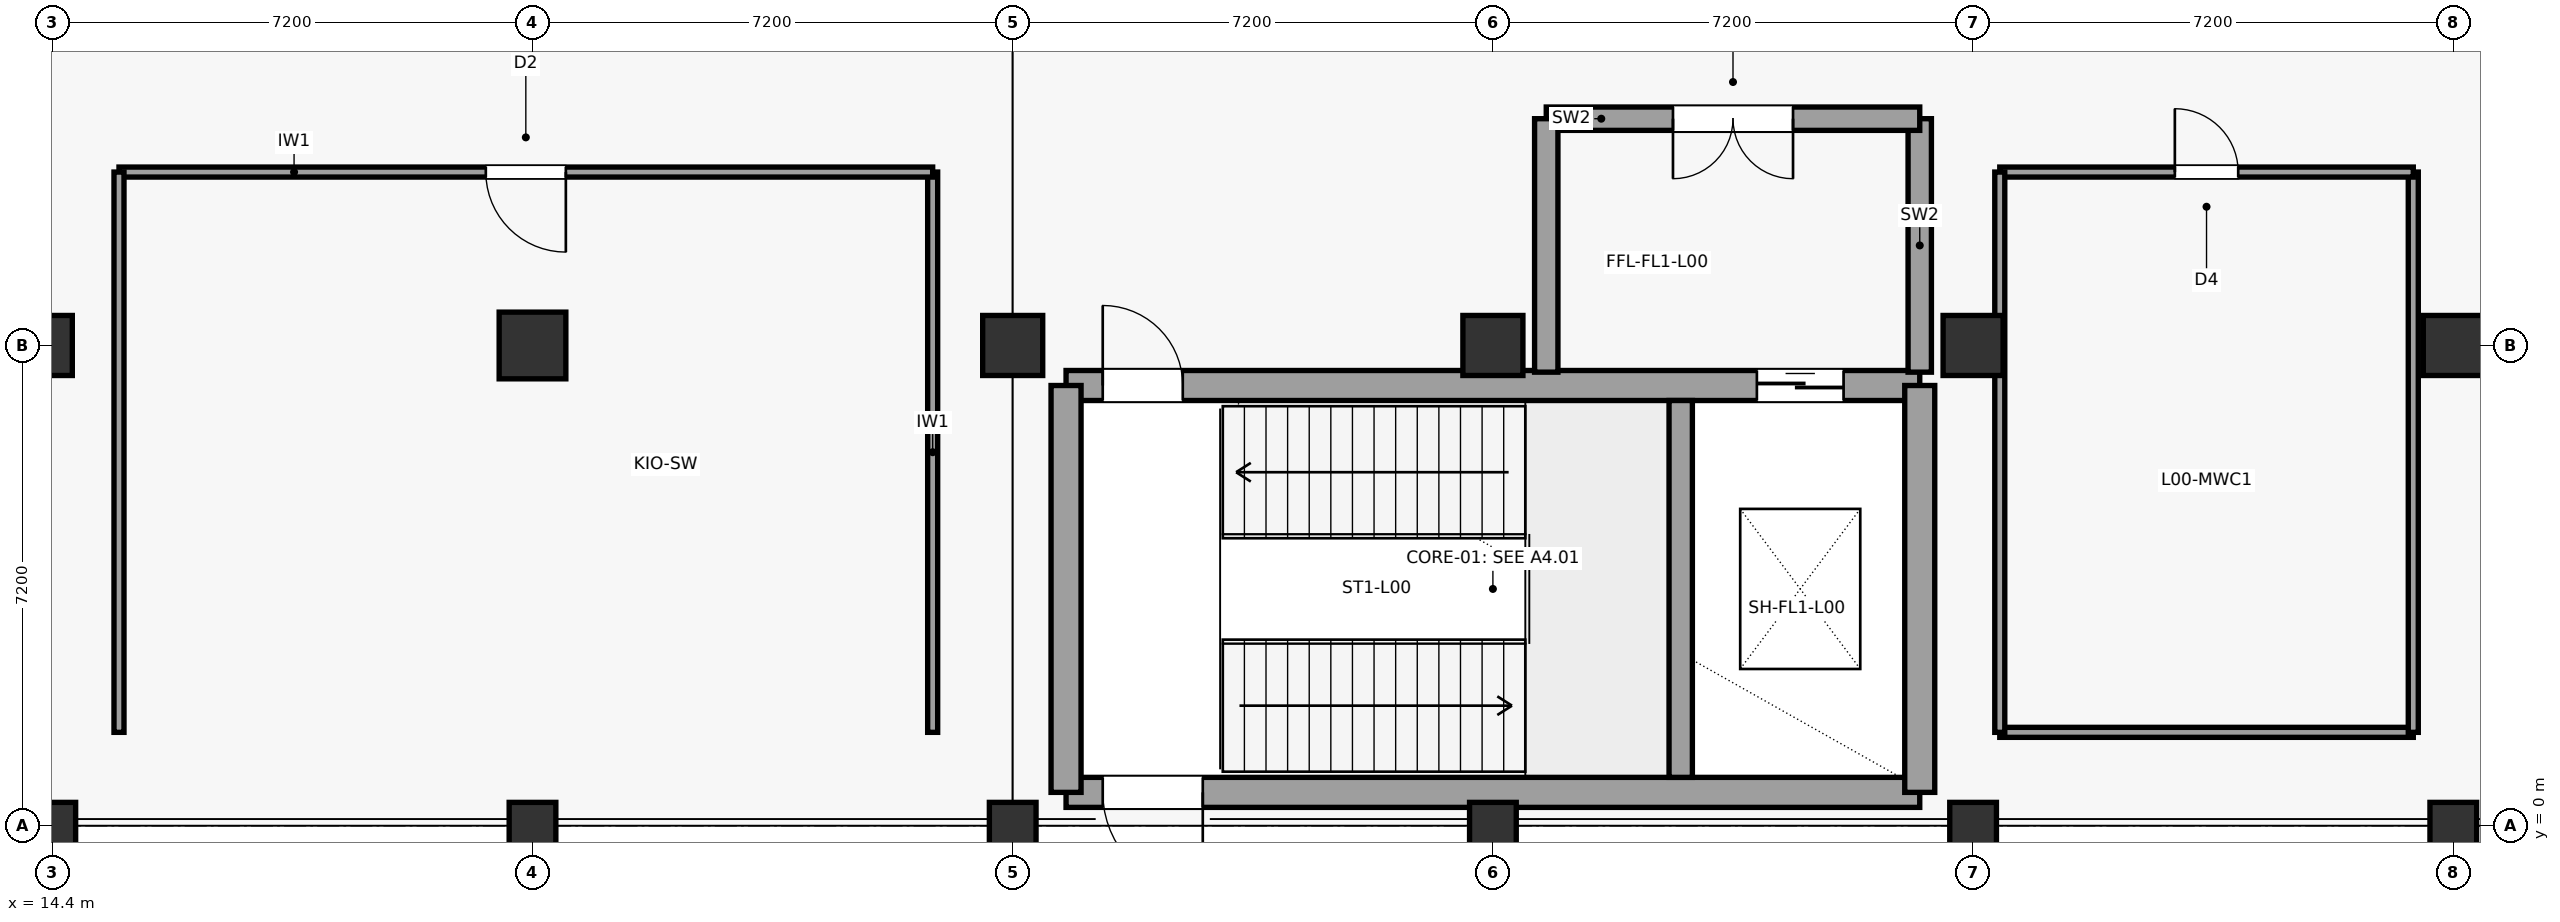
"""IFC4 building model, lengths in metres.
Left out: names, types, materials, properties, quantities, classifications, styles, units other than length and angle.
Written with IfcOpenShell. Run it as: python <this file> out.ifc"""

import sys

from ifc_helpers import new_model, si_unit, direction, frame, frame_2d, origin, origin_2d, place, context, subcontext, project, spatial, rectangle, circle, extrude, element, fill, save


model = new_model("IFC4")
c1 = context("Model", 3, precision=1e-05, world=origin(), true_north=direction((0.0, 1.0)))
c2 = subcontext(c1, "Body", "Model", "MODEL_VIEW")
j1 = project(units=[si_unit("LENGTHUNIT", "METRE"), si_unit("PLANEANGLEUNIT", "RADIAN")], contexts=[c1])
p1 = place(None, origin())
s1 = spatial("IfcSite", under=j1, at=p1, CompositionType="ELEMENT")
p2 = place(p1, origin())
s2 = spatial("IfcBuilding", under=s1, at=p2, CompositionType="ELEMENT")
p3 = place(p2, origin())
s3 = spatial("IfcBuildingStorey", under=s2, at=p3, CompositionType="ELEMENT", Elevation=0.0)
p4 = place(p3, frame((14.4, 0.0, 0.0), z_axis=(0.0, 0.0, 1.0), x_axis=(1.0, 0.0, 0.0)))
e1 = element("IfcColumn", 1, at=p4, inside=s3, PredefinedType="COLUMN", context=c2, shape_type="SweptSolid", body=[
    extrude(rectangle(XDim=0.7, YDim=0.7, at=origin_2d()), origin(), (0.0, 0.0, 1.0), 5.4),
])
p5 = place(p3, frame((14.4, 7.2, 0.0), z_axis=(0.0, 0.0, 1.0), x_axis=(1.0, 0.0, 0.0)))
e2 = element("IfcColumn", 2, at=p5, inside=s3, PredefinedType="COLUMN", context=c2, shape_type="SweptSolid", body=[
    extrude(rectangle(XDim=0.6, YDim=0.9, at=origin_2d()), origin(), (0.0, 0.0, 1.0), 5.4),
])
p6 = place(p3, frame((21.6, 0.0, 0.0), z_axis=(0.0, 0.0, 1.0), x_axis=(1.0, 0.0, 0.0)))
e3 = element("IfcColumn", 3, at=p6, inside=s3, PredefinedType="COLUMN", context=c2, shape_type="SweptSolid", body=[
    extrude(rectangle(XDim=0.7, YDim=0.7, at=origin_2d()), origin(), (0.0, 0.0, 1.0), 5.4),
])
p7 = place(p3, frame((21.6, 7.2, 0.0), z_axis=(0.0, 0.0, 1.0), x_axis=(1.0, 0.0, 0.0)))
e4 = element("IfcColumn", 4, at=p7, inside=s3, PredefinedType="COLUMN", context=c2, shape_type="SweptSolid", body=[
    extrude(circle(Radius=0.5, at=origin_2d()), origin(), (0.0, 0.0, 1.0), 5.4),
])
p8 = place(p3, frame((28.8, 0.0, 0.0), z_axis=(0.0, 0.0, 1.0), x_axis=(1.0, 0.0, 0.0)))
e5 = element("IfcColumn", 5, at=p8, inside=s3, PredefinedType="COLUMN", context=c2, shape_type="SweptSolid", body=[
    extrude(rectangle(XDim=0.7, YDim=0.7, at=origin_2d()), origin(), (0.0, 0.0, 1.0), 5.4),
])
p9 = place(p3, frame((28.8, 7.2, 0.0), z_axis=(0.0, 0.0, 1.0), x_axis=(1.0, 0.0, 0.0)))
e6 = element("IfcColumn", 6, at=p9, inside=s3, PredefinedType="COLUMN", context=c2, shape_type="SweptSolid", body=[
    extrude(rectangle(XDim=0.9, YDim=0.9, at=origin_2d()), origin(), (0.0, 0.0, 1.0), 5.4),
])
p10 = place(p3, frame((36.0, 0.0, 0.0), z_axis=(0.0, 0.0, 1.0), x_axis=(1.0, 0.0, 0.0)))
e7 = element("IfcColumn", 7, at=p10, inside=s3, PredefinedType="COLUMN", context=c2, shape_type="SweptSolid", body=[
    extrude(rectangle(XDim=0.7, YDim=0.7, at=origin_2d()), origin(), (0.0, 0.0, 1.0), 5.4),
])
p11 = place(p3, frame((36.0, 7.2, 0.0), z_axis=(0.0, 0.0, 1.0), x_axis=(1.0, 0.0, 0.0)))
e8 = element("IfcColumn", 8, at=p11, inside=s3, PredefinedType="COLUMN", context=c2, shape_type="SweptSolid", body=[
    extrude(rectangle(XDim=0.9, YDim=0.9, at=origin_2d()), origin(), (0.0, 0.0, 1.0), 5.4),
])
p12 = place(p3, frame((43.2, 0.0, 0.0), z_axis=(0.0, 0.0, 1.0), x_axis=(1.0, 0.0, 0.0)))
e9 = element("IfcColumn", 9, at=p12, inside=s3, PredefinedType="COLUMN", context=c2, shape_type="SweptSolid", body=[
    extrude(rectangle(XDim=0.7, YDim=0.7, at=origin_2d()), origin(), (0.0, 0.0, 1.0), 5.4),
])
p13 = place(p3, frame((43.2, 7.2, 0.0), z_axis=(0.0, 0.0, 1.0), x_axis=(1.0, 0.0, 0.0)))
e10 = element("IfcColumn", 10, at=p13, inside=s3, PredefinedType="COLUMN", context=c2, shape_type="SweptSolid", body=[
    extrude(rectangle(XDim=0.9, YDim=0.9, at=origin_2d()), origin(), (0.0, 0.0, 1.0), 5.4),
])
p14 = place(p3, frame((50.4, 0.0, 0.0), z_axis=(0.0, 0.0, 1.0), x_axis=(1.0, 0.0, 0.0)))
e11 = element("IfcColumn", 11, at=p14, inside=s3, PredefinedType="COLUMN", context=c2, shape_type="SweptSolid", body=[
    extrude(rectangle(XDim=0.7, YDim=0.7, at=origin_2d()), origin(), (0.0, 0.0, 1.0), 5.4),
])
p15 = place(p3, frame((50.4, 7.2, 0.0), z_axis=(0.0, 0.0, 1.0), x_axis=(1.0, 0.0, 0.0)))
e12 = element("IfcColumn", 12, at=p15, inside=s3, PredefinedType="COLUMN", context=c2, shape_type="SweptSolid", body=[
    extrude(rectangle(XDim=0.9, YDim=0.9, at=origin_2d()), origin(), (0.0, 0.0, 1.0), 5.4),
])
p16 = place(p3, frame((29.6, 0.5, 0.0), z_axis=(0.0, 0.0, 1.0), x_axis=(1.0, 0.0, 0.0)))
e13 = element("IfcWall", 13, at=p16, inside=s3, PredefinedType="SHEAR", context=c2, shape_type="SweptSolid", body=[
    extrude(rectangle(XDim=12.8, YDim=0.45, at=frame_2d((6.4, 0.0))), origin(), (0.0, 0.0, 1.0), 5.06),
])
p17 = place(p16, frame((0.55, 0.0, 0.0)))
e14 = element("IfcOpeningElement", 14, at=p17, cuts=e13, PredefinedType="OPENING", context=c2, shape_type="SweptSolid", body=[
    extrude(rectangle(XDim=1.5, YDim=2.25, at=frame_2d((0.75, 1.125))), frame((0.0, 0.235, 0.0), z_axis=(0.0, -1.0, 0.0), x_axis=(1.0, 0.0, 0.0)), (0.0, 0.0, 1.0), 0.47),
])
p18 = place(p3, frame((29.6, 6.6, 0.0), z_axis=(0.0, 0.0, 1.0), x_axis=(1.0, 0.0, 0.0)))
e15 = element("IfcWall", 15, at=p18, inside=s3, PredefinedType="SHEAR", context=c2, shape_type="SweptSolid", body=[
    extrude(rectangle(XDim=12.8, YDim=0.45, at=frame_2d((6.4, 0.0))), origin(), (0.0, 0.0, 1.0), 5.06),
])
p19 = place(p18, frame((0.55, 0.0, 0.0)))
e16 = element("IfcOpeningElement", 16, at=p19, cuts=e15, PredefinedType="OPENING", context=c2, shape_type="SweptSolid", body=[
    extrude(rectangle(XDim=1.2, YDim=2.25, at=frame_2d((0.6, 1.125))), frame((0.0, 0.235, 0.0), z_axis=(0.0, -1.0, 0.0), x_axis=(1.0, 0.0, 0.0)), (0.0, 0.0, 1.0), 0.47),
])
p20 = place(p18, frame((10.358, 0.0, 0.0)))
e17 = element("IfcOpeningElement", 17, at=p20, cuts=e15, PredefinedType="OPENING", context=c2, shape_type="SweptSolid", body=[
    extrude(rectangle(XDim=1.3, YDim=2.25, at=frame_2d((0.65, 1.125))), frame((0.0, 0.235, 0.0), z_axis=(0.0, -1.0, 0.0), x_axis=(1.0, 0.0, 0.0)), (0.0, 0.0, 1.0), 0.47),
])
for number, where, z_axis, x_axis in (
    (18, (29.6, 0.5, 0.0), (0.0, 0.0, 1.0), (0.0, 1.0, 0.0)),
    (19, (42.4, 0.5, 0.0), (0.0, 0.0, 1.0), (0.0, 1.0, 0.0)),
):
    element("IfcWall", number, at=place(p3, frame(where, z_axis=z_axis, x_axis=x_axis)), inside=s3, PredefinedType="SHEAR", context=c2, shape_type="SweptSolid", body=[
        extrude(rectangle(XDim=6.1, YDim=0.45, at=frame_2d((3.05, 0.0))), origin(), (0.0, 0.0, 1.0), 5.06),
    ])
p21 = place(p3, frame((38.816, 0.725, 0.0), z_axis=(0.0, 0.0, 1.0), x_axis=(0.0, 1.0, 0.0)))
e20 = element("IfcWall", 20, at=p21, inside=s3, PredefinedType="SHEAR", context=c2, shape_type="SweptSolid", body=[
    extrude(rectangle(XDim=5.65, YDim=0.35, at=frame_2d((2.825, 0.0))), origin(), (0.0, 0.0, 1.0), 5.06),
])
p22 = place(p3, frame((42.4, 6.8, 0.0), z_axis=(0.0, 0.0, 1.0), x_axis=(0.0, 1.0, 0.0)))
e21 = element("IfcWall", 21, at=p22, inside=s3, PredefinedType="SHEAR", context=c2, shape_type="SweptSolid", body=[
    extrude(rectangle(XDim=3.8, YDim=0.35, at=frame_2d((1.9, 0.0))), origin(), (0.0, 0.0, 1.0), 4.1),
])
p23 = place(p3, frame((42.4, 10.6, 0.0), z_axis=(0.0, 0.0, 1.0), x_axis=(-1.0, 0.0, 0.0)))
e22 = element("IfcWall", 22, at=p23, inside=s3, PredefinedType="SHEAR", context=c2, shape_type="SweptSolid", body=[
    extrude(rectangle(XDim=5.6, YDim=0.35, at=frame_2d((2.8, 0.0))), origin(), (0.0, 0.0, 1.0), 4.1),
])
p24 = place(p23, frame((1.9, 0.0, 0.0)))
e23 = element("IfcOpeningElement", 23, at=p24, cuts=e22, PredefinedType="OPENING", context=c2, shape_type="SweptSolid", body=[
    extrude(rectangle(XDim=1.8, YDim=2.3, at=frame_2d((0.9, 1.15))), frame((0.0, 0.185, 0.0), z_axis=(0.0, -1.0, 0.0), x_axis=(1.0, 0.0, 0.0)), (0.0, 0.0, 1.0), 0.37),
])
p25 = place(p3, frame((36.8, 10.6, 0.0), z_axis=(0.0, 0.0, 1.0), x_axis=(0.0, -1.0, 0.0)))
e24 = element("IfcWall", 24, at=p25, inside=s3, PredefinedType="SHEAR", context=c2, shape_type="SweptSolid", body=[
    extrude(rectangle(XDim=3.8, YDim=0.35, at=frame_2d((1.9, 0.0))), origin(), (0.0, 0.0, 1.0), 4.1),
])
p26 = place(p3, frame((27.6, 1.4, 0.0), z_axis=(0.0, 0.0, 1.0), x_axis=(0.0, 1.0, 0.0)))
e25 = element("IfcWall", 25, at=p26, inside=s3, PredefinedType="PARTITIONING", context=c2, shape_type="SweptSolid", body=[
    extrude(rectangle(XDim=8.4, YDim=0.15, at=frame_2d((4.2, 0.0))), origin(), (0.0, 0.0, 1.0), 4.1),
])
p27 = place(p3, frame((27.6, 9.8, 0.0), z_axis=(0.0, 0.0, 1.0), x_axis=(-1.0, 0.0, 0.0)))
e26 = element("IfcWall", 26, at=p27, inside=s3, PredefinedType="PARTITIONING", context=c2, shape_type="SweptSolid", body=[
    extrude(rectangle(XDim=12.2, YDim=0.15, at=frame_2d((6.1, 0.0))), origin(), (0.0, 0.0, 1.0), 4.1),
])
p28 = place(p27, frame((5.5, 0.0, 0.0)))
e27 = element("IfcOpeningElement", 27, at=p28, cuts=e26, PredefinedType="OPENING", context=c2, shape_type="SweptSolid", body=[
    extrude(rectangle(XDim=1.2, YDim=2.2, at=frame_2d((0.6, 1.1))), frame((0.0, 0.085, 0.0), z_axis=(0.0, -1.0, 0.0), x_axis=(1.0, 0.0, 0.0)), (0.0, 0.0, 1.0), 0.17),
])
p29 = place(p3, frame((15.4, 9.8, 0.0), z_axis=(0.0, 0.0, 1.0), x_axis=(0.0, -1.0, 0.0)))
e28 = element("IfcWall", 28, at=p29, inside=s3, PredefinedType="PARTITIONING", context=c2, shape_type="SweptSolid", body=[
    extrude(rectangle(XDim=8.4, YDim=0.15, at=frame_2d((4.2, 0.0))), origin(), (0.0, 0.0, 1.0), 4.1),
])
p30 = place(p3, frame((43.6, 1.4, 0.0), z_axis=(0.0, 0.0, 1.0), x_axis=(1.0, 0.0, 0.0)))
e29 = element("IfcWall", 29, at=p30, inside=s3, PredefinedType="PARTITIONING", context=c2, shape_type="SweptSolid", body=[
    extrude(rectangle(XDim=6.2, YDim=0.15, at=frame_2d((3.1, 0.0))), origin(), (0.0, 0.0, 1.0), 4.1),
])
p31 = place(p3, frame((49.8, 1.4, 0.0), z_axis=(0.0, 0.0, 1.0), x_axis=(0.0, 1.0, 0.0)))
e30 = element("IfcWall", 30, at=p31, inside=s3, PredefinedType="PARTITIONING", context=c2, shape_type="SweptSolid", body=[
    extrude(rectangle(XDim=8.4, YDim=0.15, at=frame_2d((4.2, 0.0))), origin(), (0.0, 0.0, 1.0), 4.1),
])
p32 = place(p3, frame((49.8, 9.8, 0.0), z_axis=(0.0, 0.0, 1.0), x_axis=(-1.0, 0.0, 0.0)))
e31 = element("IfcWall", 31, at=p32, inside=s3, PredefinedType="PARTITIONING", context=c2, shape_type="SweptSolid", body=[
    extrude(rectangle(XDim=6.2, YDim=0.15, at=frame_2d((3.1, 0.0))), origin(), (0.0, 0.0, 1.0), 4.1),
])
p33 = place(p32, frame((2.625, 0.0, 0.0)))
e32 = element("IfcOpeningElement", 32, at=p33, cuts=e31, PredefinedType="OPENING", context=c2, shape_type="SweptSolid", body=[
    extrude(rectangle(XDim=0.95, YDim=2.15, at=frame_2d((0.475, 1.075))), frame((0.0, 0.085, 0.0), z_axis=(0.0, -1.0, 0.0), x_axis=(1.0, 0.0, 0.0)), (0.0, 0.0, 1.0), 0.17),
])
p34 = place(p3, frame((43.6, 9.8, 0.0), z_axis=(0.0, 0.0, 1.0), x_axis=(0.0, -1.0, 0.0)))
e33 = element("IfcWall", 33, at=p34, inside=s3, PredefinedType="PARTITIONING", context=c2, shape_type="SweptSolid", body=[
    extrude(rectangle(XDim=8.4, YDim=0.15, at=frame_2d((4.2, 0.0))), origin(), (0.0, 0.0, 1.0), 4.1),
])
p35 = place(p19, origin())
e34 = element("IfcDoor", 34, at=p35, inside=s3, OperationType="SINGLE_SWING_LEFT", PredefinedType="DOOR", context=c2, shape_type="SweptSolid", body=[
    extrude(rectangle(XDim=1.2, YDim=2.25, at=frame_2d((0.6, 1.125))), frame((0.0, 0.025, 0.0), z_axis=(0.0, -1.0, 0.0), x_axis=(1.0, 0.0, 0.0)), (0.0, 0.0, 1.0), 0.05),
])
fill(e16, e34)
p36 = place(p17, frame((1.5, 0.0, 0.0), z_axis=(0.0, 0.0, 1.0), x_axis=(-1.0, 0.0, 0.0)))
e35 = element("IfcDoor", 35, at=p36, inside=s3, OperationType="SINGLE_SWING_RIGHT", PredefinedType="DOOR", context=c2, shape_type="SweptSolid", body=[
    extrude(rectangle(XDim=1.5, YDim=2.25, at=frame_2d((0.75, 1.125))), frame((0.0, 0.025, 0.0), z_axis=(0.0, -1.0, 0.0), x_axis=(1.0, 0.0, 0.0)), (0.0, 0.0, 1.0), 0.05),
])
fill(e14, e35)
p37 = place(p20, origin())
e36 = element("IfcDoor", 36, at=p37, inside=s3, OperationType="SLIDING_TO_RIGHT", PredefinedType="DOOR", context=c2, shape_type="SweptSolid", body=[
    extrude(rectangle(XDim=1.3, YDim=2.25, at=frame_2d((0.65, 1.125))), frame((0.0, 0.025, 0.0), z_axis=(0.0, -1.0, 0.0), x_axis=(1.0, 0.0, 0.0)), (0.0, 0.0, 1.0), 0.05),
])
fill(e17, e36)
p38 = place(p24, origin())
e37 = element("IfcDoor", 37, at=p38, inside=s3, OperationType="DOUBLE_DOOR_SINGLE_SWING", PredefinedType="DOOR", context=c2, shape_type="SweptSolid", body=[
    extrude(rectangle(XDim=1.8, YDim=2.3, at=frame_2d((0.9, 1.15))), frame((0.0, 0.025, 0.0), z_axis=(0.0, -1.0, 0.0), x_axis=(1.0, 0.0, 0.0)), (0.0, 0.0, 1.0), 0.05),
])
fill(e23, e37)
p39 = place(p28, origin())
e38 = element("IfcDoor", 38, at=p39, inside=s3, OperationType="SINGLE_SWING_LEFT", PredefinedType="DOOR", context=c2, shape_type="SweptSolid", body=[
    extrude(rectangle(XDim=1.2, YDim=2.2, at=frame_2d((0.6, 1.1))), frame((0.0, 0.025, 0.0), z_axis=(0.0, -1.0, 0.0), x_axis=(1.0, 0.0, 0.0)), (0.0, 0.0, 1.0), 0.05),
])
fill(e27, e38)
p40 = place(p33, frame((0.95, 0.0, 0.0), z_axis=(0.0, 0.0, 1.0), x_axis=(-1.0, 0.0, 0.0)))
e39 = element("IfcDoor", 39, at=p40, inside=s3, OperationType="SINGLE_SWING_RIGHT", PredefinedType="DOOR", context=c2, shape_type="SweptSolid", body=[
    extrude(rectangle(XDim=0.95, YDim=2.15, at=frame_2d((0.475, 1.075))), frame((0.0, 0.025, 0.0), z_axis=(0.0, -1.0, 0.0), x_axis=(1.0, 0.0, 0.0)), (0.0, 0.0, 1.0), 0.05),
])
fill(e32, e39)
save(model, sys.argv[1])
